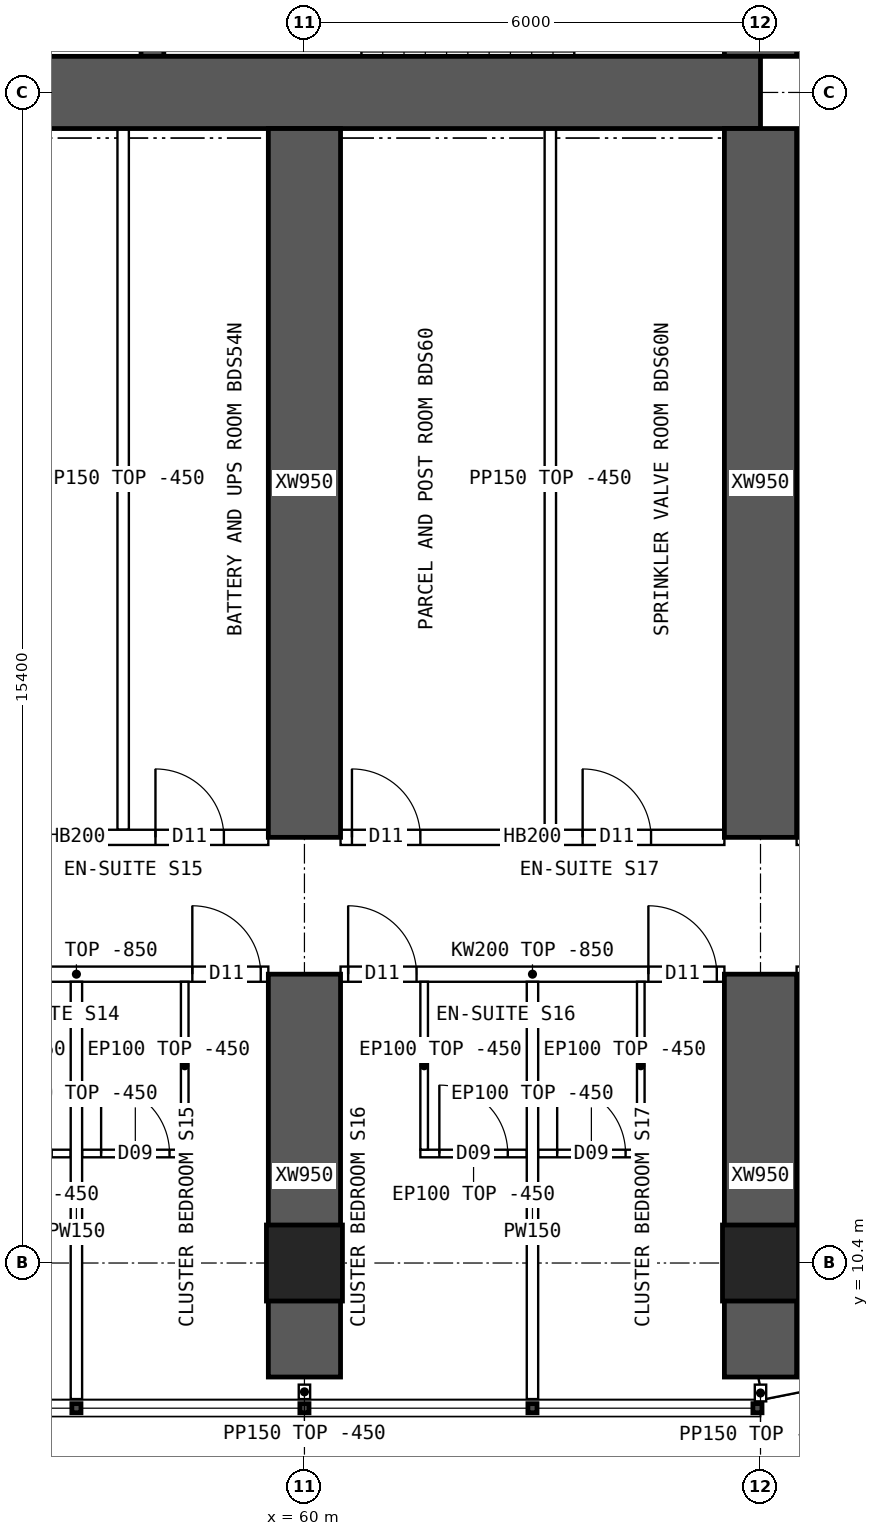
"""IFC4 building model, lengths in metres.
Left out: names, types, materials, properties, quantities, classifications, styles, units other than length and angle.
Written with IfcOpenShell. Run it as: python <this file> out.ifc"""

import sys

from ifc_helpers import new_model, si_unit, direction, frame, frame_2d, origin, origin_2d, place, context, subcontext, project, spatial, polyline, rectangle, hollow_rectangle, outline, extrude, element, fill, save


model = new_model("IFC4")
c1 = context("Model", 3, precision=1e-05, world=origin(), true_north=direction((0.0, 1.0)))
c2 = subcontext(c1, "Body", "Model", "MODEL_VIEW")
j1 = project(units=[si_unit("LENGTHUNIT", "METRE"), si_unit("PLANEANGLEUNIT", "RADIAN")], contexts=[c1])
p1 = place(None, origin())
s1 = spatial("IfcSite", under=j1, at=p1, CompositionType="ELEMENT")
p2 = place(p1, origin())
s2 = spatial("IfcBuilding", under=s1, at=p2, CompositionType="ELEMENT")
p3 = place(p2, frame((0.0, 0.0, 95.65)))
s3 = spatial("IfcBuildingStorey", under=s2, at=p3, CompositionType="ELEMENT", Elevation=95.65)
for number, where, z_axis, x_axis in (
    (1, (60.0, 10.4, 0.0), (0.0, 0.0, 1.0), (1.0, 0.0, 0.0)),
    (2, (66.0, 10.4, 0.0), (0.0, 0.0, 1.0), (1.0, 0.0, 0.0)),
):
    element("IfcColumn", number, at=place(p3, frame(where, z_axis=z_axis, x_axis=x_axis)), inside=s3, PredefinedType="COLUMN", context=c2, shape_type="SweptSolid", body=[
        extrude(hollow_rectangle(XDim=1.0, YDim=1.0, WallThickness=0.1, at=origin_2d()), origin(), (0.0, 0.0, 1.0), 3.75),
    ])
p4 = place(p3, frame((18.0, 25.8, 0.0), z_axis=(0.0, 0.0, 1.0), x_axis=(1.0, 0.0, 0.0)))
e3 = element("IfcWall", 3, at=p4, inside=s3, PredefinedType="SHEAR", context=c2, shape_type="SweptSolid", body=[
    extrude(rectangle(XDim=48.0, YDim=0.95, at=frame_2d((24.0, 0.0))), origin(), (0.0, 0.0, 1.0), 3.75),
])
p5 = place(p3, frame((66.0, 26.275, 0.0), z_axis=(0.0, 0.0, 1.0), x_axis=(0.0, 1.0, 0.0)))
e4 = element("IfcWall", 4, at=p5, inside=s3, PredefinedType="SHEAR", context=c2, shape_type="SweptSolid", body=[
    extrude(rectangle(XDim=11.45, YDim=0.95, at=frame_2d((5.725, 0.0))), origin(), (0.0, 0.0, 1.0), 3.75),
])
p6 = place(p5, frame((5.025, 0.0, 0.0)))
e5 = element("IfcOpeningElement", 5, at=p6, cuts=e4, PredefinedType="OPENING", context=c2, shape_type="SweptSolid", body=[
    extrude(rectangle(XDim=1.2, YDim=2.1, at=frame_2d((0.6, 1.05))), frame((0.0, 0.485, 0.0), z_axis=(0.0, -1.0, 0.0), x_axis=(1.0, 0.0, 0.0)), (0.0, 0.0, 1.0), 0.97),
])
p7 = place(p3, frame((58.0, 26.275, 0.0), z_axis=(0.0, 0.0, 1.0), x_axis=(0.0, 1.0, 0.0)))
e6 = element("IfcWall", 6, at=p7, inside=s3, PredefinedType="SHEAR", context=c2, shape_type="SweptSolid", body=[
    extrude(rectangle(XDim=3.975, YDim=0.3, at=frame_2d((1.988, 0.0))), origin(), (0.0, 0.0, 1.0), 3.75),
])
p8 = place(p3, frame((60.0, 8.9, 0.0), z_axis=(0.0, 0.0, 1.0), x_axis=(0.0, 1.0, 0.0)))
e7 = element("IfcWall", 7, at=p8, inside=s3, PredefinedType="SHEAR", context=c2, shape_type="SweptSolid", body=[
    extrude(rectangle(XDim=5.3, YDim=0.95, at=frame_2d((2.65, 0.0))), origin(), (0.0, 0.0, 1.0), 3.75),
])
p9 = place(p3, frame((60.0, 16.0, 0.0), z_axis=(0.0, 0.0, 1.0), x_axis=(0.0, 1.0, 0.0)))
e8 = element("IfcWall", 8, at=p9, inside=s3, PredefinedType="SHEAR", context=c2, shape_type="SweptSolid", body=[
    extrude(rectangle(XDim=9.325, YDim=0.95, at=frame_2d((4.663, 0.0))), origin(), (0.0, 0.0, 1.0), 3.75),
])
p10 = place(p3, frame((66.0, 8.9, 0.0), z_axis=(0.0, 0.0, 1.0), x_axis=(0.0, 1.0, 0.0)))
e9 = element("IfcWall", 9, at=p10, inside=s3, PredefinedType="SHEAR", context=c2, shape_type="SweptSolid", body=[
    extrude(rectangle(XDim=5.3, YDim=0.95, at=frame_2d((2.65, 0.0))), origin(), (0.0, 0.0, 1.0), 3.75),
])
p11 = place(p3, frame((66.0, 16.0, 0.0), z_axis=(0.0, 0.0, 1.0), x_axis=(0.0, 1.0, 0.0)))
e10 = element("IfcWall", 10, at=p11, inside=s3, PredefinedType="SHEAR", context=c2, shape_type="SweptSolid", body=[
    extrude(rectangle(XDim=9.325, YDim=0.95, at=frame_2d((4.663, 0.0))), origin(), (0.0, 0.0, 1.0), 3.75),
])
p12 = place(p3, frame((66.0, 8.75, 0.0), z_axis=(0.0, 0.0, 1.0), x_axis=(0.980791473772, 0.195059183267, 0.0)))
e11 = element("IfcWall", 11, at=p12, inside=s3, PredefinedType="SOLIDWALL", context=c2, shape_type="SweptSolid", body=[
    extrude(outline(polyline([(-0.03, -0.15), (3.717, -0.15), (3.657, 0.15), (0.03, 0.15), (-0.03, -0.15)])), origin(), (0.0, 0.0, 1.0), 3.3),
])
p13 = place(p12, frame((1.144, 0.0, 0.9)))
e12 = element("IfcOpeningElement", 12, at=p13, cuts=e11, PredefinedType="OPENING", context=c2, shape_type="SweptSolid", body=[
    extrude(rectangle(XDim=1.4, YDim=1.8, at=frame_2d((0.7, 0.9))), frame((0.0, 0.16, 0.0), z_axis=(0.0, -1.0, 0.0), x_axis=(1.0, 0.0, 0.0)), (0.0, 0.0, 1.0), 0.32),
])
p14 = place(p3, frame((54.475, 14.2, 0.0), z_axis=(0.0, 0.0, 1.0), x_axis=(1.0, 0.0, 0.0)))
e13 = element("IfcWall", 13, at=p14, inside=s3, PredefinedType="SOLIDWALL", context=c2, shape_type="SweptSolid", body=[
    extrude(outline(polyline([(0.0, 0.0), (5.05, 0.0), (5.05, 2.9), (0.0, 2.9), (0.0, 0.0)])), frame((0.0, 0.1, 0.0), z_axis=(0.0, -1.0, 0.0), x_axis=(1.0, 0.0, 0.0)), (0.0, 0.0, 1.0), 0.2),
])
p15 = place(p14, frame((0.1, 0.0, 0.0)))
e14 = element("IfcOpeningElement", 14, at=p15, cuts=e13, PredefinedType="OPENING", context=c2, shape_type="SweptSolid", body=[
    extrude(rectangle(XDim=0.9, YDim=2.1, at=frame_2d((0.45, 1.05))), frame((0.0, 0.11, 0.0), z_axis=(0.0, -1.0, 0.0), x_axis=(1.0, 0.0, 0.0)), (0.0, 0.0, 1.0), 0.22),
])
p16 = place(p14, frame((4.05, 0.0, 0.0)))
e15 = element("IfcOpeningElement", 15, at=p16, cuts=e13, PredefinedType="OPENING", context=c2, shape_type="SweptSolid", body=[
    extrude(rectangle(XDim=0.9, YDim=2.1, at=frame_2d((0.45, 1.05))), frame((0.0, 0.11, 0.0), z_axis=(0.0, -1.0, 0.0), x_axis=(1.0, 0.0, 0.0)), (0.0, 0.0, 1.0), 0.22),
])
p17 = place(p3, frame((54.475, 16.0, 0.0), z_axis=(0.0, 0.0, 1.0), x_axis=(1.0, 0.0, 0.0)))
e16 = element("IfcWall", 16, at=p17, inside=s3, PredefinedType="SOLIDWALL", context=c2, shape_type="SweptSolid", body=[
    extrude(rectangle(XDim=5.05, YDim=0.2, at=frame_2d((2.525, 0.0))), origin(), (0.0, 0.0, 1.0), 3.3),
])
p18 = place(p17, frame((0.35, 0.0, 0.0)))
e17 = element("IfcOpeningElement", 17, at=p18, cuts=e16, PredefinedType="OPENING", context=c2, shape_type="SweptSolid", body=[
    extrude(rectangle(XDim=0.9, YDim=2.1, at=frame_2d((0.45, 1.05))), frame((0.0, 0.11, 0.0), z_axis=(0.0, -1.0, 0.0), x_axis=(1.0, 0.0, 0.0)), (0.0, 0.0, 1.0), 0.22),
])
p19 = place(p17, frame((3.565, 0.0, 0.0)))
e18 = element("IfcOpeningElement", 18, at=p19, cuts=e16, PredefinedType="OPENING", context=c2, shape_type="SweptSolid", body=[
    extrude(rectangle(XDim=0.9, YDim=2.1, at=frame_2d((0.45, 1.05))), frame((0.0, 0.11, 0.0), z_axis=(0.0, -1.0, 0.0), x_axis=(1.0, 0.0, 0.0)), (0.0, 0.0, 1.0), 0.22),
])
p20 = place(p3, frame((60.475, 14.2, 0.0), z_axis=(0.0, 0.0, 1.0), x_axis=(1.0, 0.0, 0.0)))
e19 = element("IfcWall", 19, at=p20, inside=s3, PredefinedType="SOLIDWALL", context=c2, shape_type="SweptSolid", body=[
    extrude(outline(polyline([(0.0, 0.0), (5.05, 0.0), (5.05, 2.9), (0.0, 2.9), (0.0, 0.0)])), frame((0.0, 0.1, 0.0), z_axis=(0.0, -1.0, 0.0), x_axis=(1.0, 0.0, 0.0)), (0.0, 0.0, 1.0), 0.2),
])
p21 = place(p20, frame((0.1, 0.0, 0.0)))
e20 = element("IfcOpeningElement", 20, at=p21, cuts=e19, PredefinedType="OPENING", context=c2, shape_type="SweptSolid", body=[
    extrude(rectangle(XDim=0.9, YDim=2.1, at=frame_2d((0.45, 1.05))), frame((0.0, 0.11, 0.0), z_axis=(0.0, -1.0, 0.0), x_axis=(1.0, 0.0, 0.0)), (0.0, 0.0, 1.0), 0.22),
])
p22 = place(p20, frame((4.05, 0.0, 0.0)))
e21 = element("IfcOpeningElement", 21, at=p22, cuts=e19, PredefinedType="OPENING", context=c2, shape_type="SweptSolid", body=[
    extrude(rectangle(XDim=0.9, YDim=2.1, at=frame_2d((0.45, 1.05))), frame((0.0, 0.11, 0.0), z_axis=(0.0, -1.0, 0.0), x_axis=(1.0, 0.0, 0.0)), (0.0, 0.0, 1.0), 0.22),
])
p23 = place(p3, frame((60.475, 16.0, 0.0), z_axis=(0.0, 0.0, 1.0), x_axis=(1.0, 0.0, 0.0)))
e22 = element("IfcWall", 22, at=p23, inside=s3, PredefinedType="SOLIDWALL", context=c2, shape_type="SweptSolid", body=[
    extrude(rectangle(XDim=5.05, YDim=0.2, at=frame_2d((2.525, 0.0))), origin(), (0.0, 0.0, 1.0), 3.3),
])
p24 = place(p23, frame((0.15, 0.0, 0.0)))
e23 = element("IfcOpeningElement", 23, at=p24, cuts=e22, PredefinedType="OPENING", context=c2, shape_type="SweptSolid", body=[
    extrude(rectangle(XDim=0.9, YDim=2.1, at=frame_2d((0.45, 1.05))), frame((0.0, 0.11, 0.0), z_axis=(0.0, -1.0, 0.0), x_axis=(1.0, 0.0, 0.0)), (0.0, 0.0, 1.0), 0.22),
])
p25 = place(p23, frame((3.185, 0.0, 0.0)))
e24 = element("IfcOpeningElement", 24, at=p25, cuts=e22, PredefinedType="OPENING", context=c2, shape_type="SweptSolid", body=[
    extrude(rectangle(XDim=0.9, YDim=2.1, at=frame_2d((0.45, 1.05))), frame((0.0, 0.11, 0.0), z_axis=(0.0, -1.0, 0.0), x_axis=(1.0, 0.0, 0.0)), (0.0, 0.0, 1.0), 0.22),
])
p26 = place(p3, frame((66.475, 14.2, 0.0), z_axis=(0.0, 0.0, 1.0), x_axis=(1.0, 0.0, 0.0)))
e25 = element("IfcWall", 25, at=p26, inside=s3, PredefinedType="SOLIDWALL", context=c2, shape_type="SweptSolid", body=[
    extrude(rectangle(XDim=1.925, YDim=0.2, at=frame_2d((0.962, 0.0))), origin(), (0.0, 0.0, 1.0), 3.3),
])
p27 = place(p26, frame((0.2, 0.0, 0.0)))
e26 = element("IfcOpeningElement", 26, at=p27, cuts=e25, PredefinedType="OPENING", context=c2, shape_type="SweptSolid", body=[
    extrude(rectangle(XDim=0.9, YDim=2.1, at=frame_2d((0.45, 1.05))), frame((0.0, 0.11, 0.0), z_axis=(0.0, -1.0, 0.0), x_axis=(1.0, 0.0, 0.0)), (0.0, 0.0, 1.0), 0.22),
])
p28 = place(p3, frame((66.475, 16.0, 0.0), z_axis=(0.0, 0.0, 1.0), x_axis=(1.0, 0.0, 0.0)))
e27 = element("IfcWall", 27, at=p28, inside=s3, PredefinedType="SOLIDWALL", context=c2, shape_type="SweptSolid", body=[
    extrude(rectangle(XDim=1.925, YDim=0.2, at=frame_2d((0.962, 0.0))), origin(), (0.0, 0.0, 1.0), 3.3),
])
p29 = place(p28, frame((0.05, 0.0, 0.0)))
e28 = element("IfcOpeningElement", 28, at=p29, cuts=e27, PredefinedType="OPENING", context=c2, shape_type="SweptSolid", body=[
    extrude(rectangle(XDim=1.2, YDim=2.1, at=frame_2d((0.6, 1.05))), frame((0.0, 0.11, 0.0), z_axis=(0.0, -1.0, 0.0), x_axis=(1.0, 0.0, 0.0)), (0.0, 0.0, 1.0), 0.22),
])
p30 = place(p3, frame((57.0, 8.61, 0.0), z_axis=(0.0, 0.0, 1.0), x_axis=(0.0, 1.0, 0.0)))
e29 = element("IfcWall", 29, at=p30, inside=s3, PredefinedType="PARTITIONING", context=c2, shape_type="SweptSolid", body=[
    extrude(outline(polyline([(0.0, 0.0), (5.49, 0.0), (5.49, 2.9), (5.442, 2.9), (5.44, 3.3), (1.992, 3.3), (1.99, 2.9), (1.592, 2.9), (1.59, 3.3), (0.0, 3.3), (0.0, 0.0)])), frame((0.0, 0.075, 0.0), z_axis=(0.0, -1.0, 0.0), x_axis=(1.0, 0.0, 0.0)), (0.0, 0.0, 1.0), 0.15),
])
p31 = place(p3, frame((56.925, 11.841, 0.0), z_axis=(0.0, 0.0, 1.0), x_axis=(-1.0, 0.0, 0.0)))
e30 = element("IfcWall", 30, at=p31, inside=s3, PredefinedType="PARTITIONING", context=c2, shape_type="SweptSolid", body=[
    extrude(rectangle(XDim=1.4, YDim=0.1, at=frame_2d((0.7, 0.0))), origin(), (0.0, 0.0, 1.0), 3.3),
])
p32 = place(p31, frame((0.25, 0.0, 0.0)))
e31 = element("IfcOpeningElement", 31, at=p32, cuts=e30, PredefinedType="OPENING", context=c2, shape_type="SweptSolid", body=[
    extrude(rectangle(XDim=0.9, YDim=2.1, at=frame_2d((0.45, 1.05))), frame((0.0, 0.06, 0.0), z_axis=(0.0, -1.0, 0.0), x_axis=(1.0, 0.0, 0.0)), (0.0, 0.0, 1.0), 0.12),
])
p33 = place(p3, frame((58.475, 11.841, 0.0), z_axis=(0.0, 0.0, 1.0), x_axis=(-1.0, 0.0, 0.0)))
e32 = element("IfcWall", 32, at=p33, inside=s3, PredefinedType="PARTITIONING", context=c2, shape_type="SweptSolid", body=[
    extrude(rectangle(XDim=1.4, YDim=0.1, at=frame_2d((0.7, 0.0))), origin(), (0.0, 0.0, 1.0), 3.3),
])
p34 = place(p33, frame((0.25, 0.0, 0.0)))
e33 = element("IfcOpeningElement", 33, at=p34, cuts=e32, PredefinedType="OPENING", context=c2, shape_type="SweptSolid", body=[
    extrude(rectangle(XDim=0.9, YDim=2.1, at=frame_2d((0.45, 1.05))), frame((0.0, 0.06, 0.0), z_axis=(0.0, -1.0, 0.0), x_axis=(1.0, 0.0, 0.0)), (0.0, 0.0, 1.0), 0.12),
])
p35 = place(p3, frame((58.425, 11.891, 0.0), z_axis=(0.0, 0.0, 1.0), x_axis=(0.0, 1.0, 0.0)))
e34 = element("IfcWall", 34, at=p35, inside=s3, PredefinedType="PARTITIONING", context=c2, shape_type="SweptSolid", body=[
    extrude(outline(polyline([(0.0, 0.0), (2.209, 0.0), (2.209, 2.9), (2.161, 2.9), (2.159, 3.3), (0.0, 3.3), (0.0, 0.0)])), frame((0.0, 0.05, 0.0), z_axis=(0.0, -1.0, 0.0), x_axis=(1.0, 0.0, 0.0)), (0.0, 0.0, 1.0), 0.1),
])
p36 = place(p3, frame((63.0, 8.61, 0.0), z_axis=(0.0, 0.0, 1.0), x_axis=(0.0, 1.0, 0.0)))
e35 = element("IfcWall", 35, at=p36, inside=s3, PredefinedType="PARTITIONING", context=c2, shape_type="SweptSolid", body=[
    extrude(outline(polyline([(0.0, 0.0), (5.49, 0.0), (5.49, 2.9), (5.442, 2.9), (5.44, 3.3), (1.992, 3.3), (1.99, 2.9), (1.592, 2.9), (1.59, 3.3), (0.0, 3.3), (0.0, 0.0)])), frame((0.0, 0.075, 0.0), z_axis=(0.0, -1.0, 0.0), x_axis=(1.0, 0.0, 0.0)), (0.0, 0.0, 1.0), 0.15),
])
p37 = place(p3, frame((62.925, 11.841, 0.0), z_axis=(0.0, 0.0, 1.0), x_axis=(-1.0, 0.0, 0.0)))
e36 = element("IfcWall", 36, at=p37, inside=s3, PredefinedType="PARTITIONING", context=c2, shape_type="SweptSolid", body=[
    extrude(rectangle(XDim=1.4, YDim=0.1, at=frame_2d((0.7, 0.0))), origin(), (0.0, 0.0, 1.0), 3.3),
])
p38 = place(p37, frame((0.25, 0.0, 0.0)))
e37 = element("IfcOpeningElement", 37, at=p38, cuts=e36, PredefinedType="OPENING", context=c2, shape_type="SweptSolid", body=[
    extrude(rectangle(XDim=0.9, YDim=2.1, at=frame_2d((0.45, 1.05))), frame((0.0, 0.06, 0.0), z_axis=(0.0, -1.0, 0.0), x_axis=(1.0, 0.0, 0.0)), (0.0, 0.0, 1.0), 0.12),
])
p39 = place(p3, frame((61.575, 11.891, 0.0), z_axis=(0.0, 0.0, 1.0), x_axis=(0.0, 1.0, 0.0)))
e38 = element("IfcWall", 38, at=p39, inside=s3, PredefinedType="PARTITIONING", context=c2, shape_type="SweptSolid", body=[
    extrude(outline(polyline([(0.0, 0.0), (2.209, 0.0), (2.209, 2.9), (2.161, 2.9), (2.159, 3.3), (0.0, 3.3), (0.0, 0.0)])), frame((0.0, 0.05, 0.0), z_axis=(0.0, -1.0, 0.0), x_axis=(1.0, 0.0, 0.0)), (0.0, 0.0, 1.0), 0.1),
])
p40 = place(p3, frame((64.475, 11.841, 0.0), z_axis=(0.0, 0.0, 1.0), x_axis=(-1.0, 0.0, 0.0)))
e39 = element("IfcWall", 39, at=p40, inside=s3, PredefinedType="PARTITIONING", context=c2, shape_type="SweptSolid", body=[
    extrude(rectangle(XDim=1.4, YDim=0.1, at=frame_2d((0.7, 0.0))), origin(), (0.0, 0.0, 1.0), 3.3),
])
p41 = place(p40, frame((0.25, 0.0, 0.0)))
e40 = element("IfcOpeningElement", 40, at=p41, cuts=e39, PredefinedType="OPENING", context=c2, shape_type="SweptSolid", body=[
    extrude(rectangle(XDim=0.9, YDim=2.1, at=frame_2d((0.45, 1.05))), frame((0.0, 0.06, 0.0), z_axis=(0.0, -1.0, 0.0), x_axis=(1.0, 0.0, 0.0)), (0.0, 0.0, 1.0), 0.12),
])
p42 = place(p3, frame((64.425, 11.891, 0.0), z_axis=(0.0, 0.0, 1.0), x_axis=(0.0, 1.0, 0.0)))
e41 = element("IfcWall", 41, at=p42, inside=s3, PredefinedType="PARTITIONING", context=c2, shape_type="SweptSolid", body=[
    extrude(outline(polyline([(0.0, 0.0), (2.209, 0.0), (2.209, 2.9), (2.161, 2.9), (2.159, 3.3), (0.0, 3.3), (0.0, 0.0)])), frame((0.0, 0.05, 0.0), z_axis=(0.0, -1.0, 0.0), x_axis=(1.0, 0.0, 0.0)), (0.0, 0.0, 1.0), 0.1),
])
for number, where, z_axis, x_axis in (
    (42, (57.615, 16.1, 0.0), (0.0, 0.0, 1.0), (0.0, 1.0, 0.0)),
    (43, (63.235, 16.1, 0.0), (0.0, 0.0, 1.0), (0.0, 1.0, 0.0)),
):
    element("IfcWall", number, at=place(p3, frame(where, z_axis=z_axis, x_axis=x_axis)), inside=s3, PredefinedType="PARTITIONING", context=c2, shape_type="SweptSolid", body=[
        extrude(rectangle(XDim=9.225, YDim=0.15, at=frame_2d((4.612, 0.0))), origin(), (0.0, 0.0, 1.0), 3.3),
    ])
p43 = place(p3, frame((60.0, 8.8, 0.0), z_axis=(0.0, 0.0, 1.0), x_axis=(0.0, -1.0, 0.0)))
e44 = element("IfcWall", 44, at=p43, inside=s3, PredefinedType="PARTITIONING", context=c2, shape_type="SweptSolid", body=[
    extrude(rectangle(XDim=0.19, YDim=0.15, at=frame_2d((0.095, 0.0))), origin(), (0.0, 0.0, 1.0), 3.3),
])
p44 = place(p3, frame((66.0, 8.8, 0.0), z_axis=(0.0, 0.0, 1.0), x_axis=(0.0, -1.0, 0.0)))
e45 = element("IfcWall", 45, at=p44, inside=s3, PredefinedType="PARTITIONING", context=c2, shape_type="SweptSolid", body=[
    extrude(rectangle(XDim=0.22, YDim=0.15, at=frame_2d((0.11, 0.0))), origin(), (0.0, 0.0, 1.0), 3.3),
])
p45 = place(p34, origin())
e46 = element("IfcDoor", 46, at=p45, inside=s3, OperationType="SINGLE_SWING_RIGHT", PredefinedType="DOOR", context=c2, shape_type="SweptSolid", body=[
    extrude(rectangle(XDim=0.9, YDim=2.1, at=frame_2d((0.45, 1.05))), frame((0.0, 0.025, 0.0), z_axis=(0.0, -1.0, 0.0), x_axis=(1.0, 0.0, 0.0)), (0.0, 0.0, 1.0), 0.05),
])
fill(e33, e46)
p46 = place(p16, origin())
e47 = element("IfcDoor", 47, at=p46, inside=s3, OperationType="SINGLE_SWING_LEFT", PredefinedType="DOOR", context=c2, shape_type="SweptSolid", body=[
    extrude(rectangle(XDim=0.9, YDim=2.1, at=frame_2d((0.45, 1.05))), frame((0.0, 0.025, 0.0), z_axis=(0.0, -1.0, 0.0), x_axis=(1.0, 0.0, 0.0)), (0.0, 0.0, 1.0), 0.05),
])
fill(e15, e47)
p47 = place(p38, origin())
e48 = element("IfcDoor", 48, at=p47, inside=s3, OperationType="SINGLE_SWING_RIGHT", PredefinedType="DOOR", context=c2, shape_type="SweptSolid", body=[
    extrude(rectangle(XDim=0.9, YDim=2.1, at=frame_2d((0.45, 1.05))), frame((0.0, 0.025, 0.0), z_axis=(0.0, -1.0, 0.0), x_axis=(1.0, 0.0, 0.0)), (0.0, 0.0, 1.0), 0.05),
])
fill(e37, e48)
p48 = place(p21, origin())
e49 = element("IfcDoor", 49, at=p48, inside=s3, OperationType="SINGLE_SWING_LEFT", PredefinedType="DOOR", context=c2, shape_type="SweptSolid", body=[
    extrude(rectangle(XDim=0.9, YDim=2.1, at=frame_2d((0.45, 1.05))), frame((0.0, 0.025, 0.0), z_axis=(0.0, -1.0, 0.0), x_axis=(1.0, 0.0, 0.0)), (0.0, 0.0, 1.0), 0.05),
])
fill(e20, e49)
p49 = place(p41, origin())
e50 = element("IfcDoor", 50, at=p49, inside=s3, OperationType="SINGLE_SWING_RIGHT", PredefinedType="DOOR", context=c2, shape_type="SweptSolid", body=[
    extrude(rectangle(XDim=0.9, YDim=2.1, at=frame_2d((0.45, 1.05))), frame((0.0, 0.025, 0.0), z_axis=(0.0, -1.0, 0.0), x_axis=(1.0, 0.0, 0.0)), (0.0, 0.0, 1.0), 0.05),
])
fill(e40, e50)
p50 = place(p22, origin())
e51 = element("IfcDoor", 51, at=p50, inside=s3, OperationType="SINGLE_SWING_LEFT", PredefinedType="DOOR", context=c2, shape_type="SweptSolid", body=[
    extrude(rectangle(XDim=0.9, YDim=2.1, at=frame_2d((0.45, 1.05))), frame((0.0, 0.025, 0.0), z_axis=(0.0, -1.0, 0.0), x_axis=(1.0, 0.0, 0.0)), (0.0, 0.0, 1.0), 0.05),
])
fill(e21, e51)
p51 = place(p19, origin())
e52 = element("IfcDoor", 52, at=p51, inside=s3, OperationType="SINGLE_SWING_LEFT", PredefinedType="DOOR", context=c2, shape_type="SweptSolid", body=[
    extrude(rectangle(XDim=0.9, YDim=2.1, at=frame_2d((0.45, 1.05))), frame((0.0, 0.025, 0.0), z_axis=(0.0, -1.0, 0.0), x_axis=(1.0, 0.0, 0.0)), (0.0, 0.0, 1.0), 0.05),
])
fill(e18, e52)
p52 = place(p24, origin())
e53 = element("IfcDoor", 53, at=p52, inside=s3, OperationType="SINGLE_SWING_LEFT", PredefinedType="DOOR", context=c2, shape_type="SweptSolid", body=[
    extrude(rectangle(XDim=0.9, YDim=2.1, at=frame_2d((0.45, 1.05))), frame((0.0, 0.025, 0.0), z_axis=(0.0, -1.0, 0.0), x_axis=(1.0, 0.0, 0.0)), (0.0, 0.0, 1.0), 0.05),
])
fill(e23, e53)
p53 = place(p25, origin())
e54 = element("IfcDoor", 54, at=p53, inside=s3, OperationType="SINGLE_SWING_LEFT", PredefinedType="DOOR", context=c2, shape_type="SweptSolid", body=[
    extrude(rectangle(XDim=0.9, YDim=2.1, at=frame_2d((0.45, 1.05))), frame((0.0, 0.025, 0.0), z_axis=(0.0, -1.0, 0.0), x_axis=(1.0, 0.0, 0.0)), (0.0, 0.0, 1.0), 0.05),
])
fill(e24, e54)
save(model, sys.argv[1])
